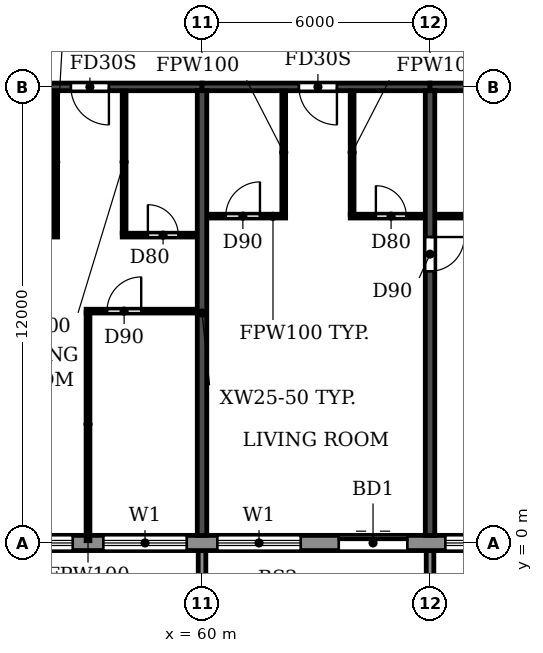
"""IFC4 building model, lengths in metres.
Left out: names, types, materials, properties, quantities, classifications, styles, units other than length and angle.
Written with IfcOpenShell. Run it as: python <this file> out.ifc"""

import sys

from ifc_helpers import new_model, si_unit, direction, frame, frame_2d, origin, place, context, subcontext, project, spatial, polyline, rectangle, outline, extrude, source, transform, mapped, element, fill, save


model = new_model("IFC4")
c1 = context("Model", 3, precision=1e-05, world=origin(), true_north=direction((0.0, 1.0)))
c2 = subcontext(c1, "Body", "Model", "MODEL_VIEW")
j1 = project(units=[si_unit("LENGTHUNIT", "METRE"), si_unit("PLANEANGLEUNIT", "RADIAN")], contexts=[c1])
p1 = place(None, origin())
s1 = spatial("IfcSite", under=j1, at=p1, CompositionType="ELEMENT")
p2 = place(p1, origin())
s2 = spatial("IfcBuilding", under=s1, at=p2, CompositionType="ELEMENT")
p3 = place(p2, frame((0.0, 0.0, 191.7)))
s3 = spatial("IfcBuildingStorey", under=s2, at=p3, CompositionType="ELEMENT", Elevation=191.7)
p4 = place(p3, frame((60.0, 0.2, 0.0), z_axis=(0.0, 0.0, 1.0), x_axis=(0.0, 1.0, 0.0)))
e1 = element("IfcWall", 1, at=p4, inside=s3, PredefinedType="SHEAR", context=c2, shape_type="SweptSolid", body=[
    extrude(rectangle(XDim=11.7, YDim=0.25, at=frame_2d((5.85, 0.0))), origin(), (0.0, 0.0, 1.0), 3.08),
])
p5 = place(p3, frame((66.0, 0.2, 0.0), z_axis=(0.0, 0.0, 1.0), x_axis=(0.0, 1.0, 0.0)))
e2 = element("IfcWall", 2, at=p5, inside=s3, PredefinedType="SHEAR", context=c2, shape_type="SweptSolid", body=[
    extrude(rectangle(XDim=11.7, YDim=0.25, at=frame_2d((5.85, 0.0))), origin(), (0.0, 0.0, 1.0), 3.08),
])
p6 = place(p5, frame((6.95, 0.0, 0.0)))
e3 = element("IfcOpeningElement", 3, at=p6, cuts=e2, PredefinedType="OPENING", context=c2, shape_type="SweptSolid", body=[
    extrude(rectangle(XDim=0.9, YDim=2.1, at=frame_2d((0.45, 1.05))), frame((0.0, 0.135, 0.0), z_axis=(0.0, -1.0, 0.0), x_axis=(1.0, 0.0, 0.0)), (0.0, 0.0, 1.0), 0.27),
])
p7 = place(p3, frame((54.0, 12.0, 0.0), z_axis=(0.0, 0.0, 1.0), x_axis=(1.0, 0.0, 0.0)))
e4 = element("IfcWall", 4, at=p7, inside=s3, PredefinedType="SHEAR", context=c2, shape_type="SweptSolid", body=[
    extrude(rectangle(XDim=6.0, YDim=0.2, at=frame_2d((3.0, 0.0))), origin(), (0.0, 0.0, 1.0), 2.48),
])
p8 = place(p7, frame((2.55, 0.0, 0.0)))
e5 = element("IfcOpeningElement", 5, at=p8, cuts=e4, PredefinedType="OPENING", context=c2, shape_type="SweptSolid", body=[
    extrude(rectangle(XDim=1.0, YDim=2.1, at=frame_2d((0.5, 1.05))), frame((0.0, 0.11, 0.0), z_axis=(0.0, -1.0, 0.0), x_axis=(1.0, 0.0, 0.0)), (0.0, 0.0, 1.0), 0.22),
])
p9 = place(p3, frame((60.0, 12.0, 0.0), z_axis=(0.0, 0.0, 1.0), x_axis=(1.0, 0.0, 0.0)))
e6 = element("IfcWall", 6, at=p9, inside=s3, PredefinedType="SHEAR", context=c2, shape_type="SweptSolid", body=[
    extrude(rectangle(XDim=6.0, YDim=0.2, at=frame_2d((3.0, 0.0))), origin(), (0.0, 0.0, 1.0), 2.48),
])
p10 = place(p9, frame((2.55, 0.0, 0.0)))
e7 = element("IfcOpeningElement", 7, at=p10, cuts=e6, PredefinedType="OPENING", context=c2, shape_type="SweptSolid", body=[
    extrude(rectangle(XDim=1.0, YDim=2.1, at=frame_2d((0.5, 1.05))), frame((0.0, 0.11, 0.0), z_axis=(0.0, -1.0, 0.0), x_axis=(1.0, 0.0, 0.0)), (0.0, 0.0, 1.0), 0.22),
])
p11 = place(p3, frame((66.0, 12.0, 0.0), z_axis=(0.0, 0.0, 1.0), x_axis=(1.0, 0.0, 0.0)))
e8 = element("IfcWall", 8, at=p11, inside=s3, PredefinedType="SHEAR", context=c2, shape_type="SweptSolid", body=[
    extrude(rectangle(XDim=6.0, YDim=0.2, at=frame_2d((3.0, 0.0))), origin(), (0.0, 0.0, 1.0), 2.48),
])
p12 = place(p3, frame((22.683, 0.0, 0.0), z_axis=(0.0, 0.0, 1.0), x_axis=(1.0, 0.0, 0.0)))
e9 = element("IfcWall", 9, at=p12, inside=s3, PredefinedType="STANDARD", context=c2, shape_type="SweptSolid", body=[
    extrude(rectangle(XDim=56.634, YDim=0.4, at=frame_2d((28.317, 0.0))), origin(), (0.0, 0.0, 1.0), 3.08),
])
p13 = place(p12, frame((1.717, 0.0, 0.9)))
e10 = element("IfcOpeningElement", 10, at=p13, cuts=e9, PredefinedType="OPENING", context=c2, shape_type="SweptSolid", body=[
    extrude(rectangle(XDim=2.2, YDim=1.5, at=frame_2d((1.1, 0.75))), frame((0.0, 0.21, 0.0), z_axis=(0.0, -1.0, 0.0), x_axis=(1.0, 0.0, 0.0)), (0.0, 0.0, 1.0), 0.42),
])
p14 = place(p12, frame((4.917, 0.0, 0.0)))
e11 = element("IfcOpeningElement", 11, at=p14, cuts=e9, PredefinedType="OPENING", context=c2, shape_type="SweptSolid", body=[
    extrude(rectangle(XDim=1.8, YDim=2.4, at=frame_2d((0.9, 1.2))), frame((0.0, 0.21, 0.0), z_axis=(0.0, -1.0, 0.0), x_axis=(1.0, 0.0, 0.0)), (0.0, 0.0, 1.0), 0.42),
])
p15 = place(p12, frame((7.717, 0.0, 0.9)))
e12 = element("IfcOpeningElement", 12, at=p15, cuts=e9, PredefinedType="OPENING", context=c2, shape_type="SweptSolid", body=[
    extrude(rectangle(XDim=2.2, YDim=1.5, at=frame_2d((1.1, 0.75))), frame((0.0, 0.21, 0.0), z_axis=(0.0, -1.0, 0.0), x_axis=(1.0, 0.0, 0.0)), (0.0, 0.0, 1.0), 0.42),
])
p16 = place(p12, frame((10.717, 0.0, 0.9)))
e13 = element("IfcOpeningElement", 13, at=p16, cuts=e9, PredefinedType="OPENING", context=c2, shape_type="SweptSolid", body=[
    extrude(rectangle(XDim=2.2, YDim=1.5, at=frame_2d((1.1, 0.75))), frame((0.0, 0.21, 0.0), z_axis=(0.0, -1.0, 0.0), x_axis=(1.0, 0.0, 0.0)), (0.0, 0.0, 1.0), 0.42),
])
p17 = place(p12, frame((13.717, 0.0, 0.9)))
e14 = element("IfcOpeningElement", 14, at=p17, cuts=e9, PredefinedType="OPENING", context=c2, shape_type="SweptSolid", body=[
    extrude(rectangle(XDim=2.2, YDim=1.5, at=frame_2d((1.1, 0.75))), frame((0.0, 0.21, 0.0), z_axis=(0.0, -1.0, 0.0), x_axis=(1.0, 0.0, 0.0)), (0.0, 0.0, 1.0), 0.42),
])
p18 = place(p12, frame((16.917, 0.0, 0.0)))
e15 = element("IfcOpeningElement", 15, at=p18, cuts=e9, PredefinedType="OPENING", context=c2, shape_type="SweptSolid", body=[
    extrude(rectangle(XDim=1.8, YDim=2.4, at=frame_2d((0.9, 1.2))), frame((0.0, 0.21, 0.0), z_axis=(0.0, -1.0, 0.0), x_axis=(1.0, 0.0, 0.0)), (0.0, 0.0, 1.0), 0.42),
])
p19 = place(p12, frame((19.717, 0.0, 0.9)))
e16 = element("IfcOpeningElement", 16, at=p19, cuts=e9, PredefinedType="OPENING", context=c2, shape_type="SweptSolid", body=[
    extrude(rectangle(XDim=2.2, YDim=1.5, at=frame_2d((1.1, 0.75))), frame((0.0, 0.21, 0.0), z_axis=(0.0, -1.0, 0.0), x_axis=(1.0, 0.0, 0.0)), (0.0, 0.0, 1.0), 0.42),
])
p20 = place(p12, frame((22.717, 0.0, 0.9)))
e17 = element("IfcOpeningElement", 17, at=p20, cuts=e9, PredefinedType="OPENING", context=c2, shape_type="SweptSolid", body=[
    extrude(rectangle(XDim=2.2, YDim=1.5, at=frame_2d((1.1, 0.75))), frame((0.0, 0.21, 0.0), z_axis=(0.0, -1.0, 0.0), x_axis=(1.0, 0.0, 0.0)), (0.0, 0.0, 1.0), 0.42),
])
p21 = place(p12, frame((25.917, 0.0, 0.0)))
e18 = element("IfcOpeningElement", 18, at=p21, cuts=e9, PredefinedType="OPENING", context=c2, shape_type="SweptSolid", body=[
    extrude(rectangle(XDim=1.8, YDim=2.4, at=frame_2d((0.9, 1.2))), frame((0.0, 0.21, 0.0), z_axis=(0.0, -1.0, 0.0), x_axis=(1.0, 0.0, 0.0)), (0.0, 0.0, 1.0), 0.42),
])
p22 = place(p12, frame((28.717, 0.0, 0.9)))
e19 = element("IfcOpeningElement", 19, at=p22, cuts=e9, PredefinedType="OPENING", context=c2, shape_type="SweptSolid", body=[
    extrude(rectangle(XDim=2.2, YDim=1.5, at=frame_2d((1.1, 0.75))), frame((0.0, 0.21, 0.0), z_axis=(0.0, -1.0, 0.0), x_axis=(1.0, 0.0, 0.0)), (0.0, 0.0, 1.0), 0.42),
])
p23 = place(p12, frame((31.717, 0.0, 0.9)))
e20 = element("IfcOpeningElement", 20, at=p23, cuts=e9, PredefinedType="OPENING", context=c2, shape_type="SweptSolid", body=[
    extrude(rectangle(XDim=2.2, YDim=1.5, at=frame_2d((1.1, 0.75))), frame((0.0, 0.21, 0.0), z_axis=(0.0, -1.0, 0.0), x_axis=(1.0, 0.0, 0.0)), (0.0, 0.0, 1.0), 0.42),
])
p24 = place(p12, frame((34.717, 0.0, 0.9)))
e21 = element("IfcOpeningElement", 21, at=p24, cuts=e9, PredefinedType="OPENING", context=c2, shape_type="SweptSolid", body=[
    extrude(rectangle(XDim=2.2, YDim=1.5, at=frame_2d((1.1, 0.75))), frame((0.0, 0.21, 0.0), z_axis=(0.0, -1.0, 0.0), x_axis=(1.0, 0.0, 0.0)), (0.0, 0.0, 1.0), 0.42),
])
p25 = place(p12, frame((37.717, 0.0, 0.9)))
e22 = element("IfcOpeningElement", 22, at=p25, cuts=e9, PredefinedType="OPENING", context=c2, shape_type="SweptSolid", body=[
    extrude(rectangle(XDim=2.2, YDim=1.5, at=frame_2d((1.1, 0.75))), frame((0.0, 0.21, 0.0), z_axis=(0.0, -1.0, 0.0), x_axis=(1.0, 0.0, 0.0)), (0.0, 0.0, 1.0), 0.42),
])
p26 = place(p12, frame((40.917, 0.0, 0.0)))
e23 = element("IfcOpeningElement", 23, at=p26, cuts=e9, PredefinedType="OPENING", context=c2, shape_type="SweptSolid", body=[
    extrude(rectangle(XDim=1.8, YDim=2.4, at=frame_2d((0.9, 1.2))), frame((0.0, 0.21, 0.0), z_axis=(0.0, -1.0, 0.0), x_axis=(1.0, 0.0, 0.0)), (0.0, 0.0, 1.0), 0.42),
])
p27 = place(p12, frame((43.717, 0.0, 0.9)))
e24 = element("IfcOpeningElement", 24, at=p27, cuts=e9, PredefinedType="OPENING", context=c2, shape_type="SweptSolid", body=[
    extrude(rectangle(XDim=2.2, YDim=1.5, at=frame_2d((1.1, 0.75))), frame((0.0, 0.21, 0.0), z_axis=(0.0, -1.0, 0.0), x_axis=(1.0, 0.0, 0.0)), (0.0, 0.0, 1.0), 0.42),
])
p28 = place(p12, frame((46.717, 0.0, 0.9)))
e25 = element("IfcOpeningElement", 25, at=p28, cuts=e9, PredefinedType="OPENING", context=c2, shape_type="SweptSolid", body=[
    extrude(rectangle(XDim=2.2, YDim=1.5, at=frame_2d((1.1, 0.75))), frame((0.0, 0.21, 0.0), z_axis=(0.0, -1.0, 0.0), x_axis=(1.0, 0.0, 0.0)), (0.0, 0.0, 1.0), 0.42),
])
p29 = place(p12, frame((49.917, 0.0, 0.0)))
e26 = element("IfcOpeningElement", 26, at=p29, cuts=e9, PredefinedType="OPENING", context=c2, shape_type="SweptSolid", body=[
    extrude(rectangle(XDim=1.8, YDim=2.4, at=frame_2d((0.9, 1.2))), frame((0.0, 0.21, 0.0), z_axis=(0.0, -1.0, 0.0), x_axis=(1.0, 0.0, 0.0)), (0.0, 0.0, 1.0), 0.42),
])
p30 = place(p12, frame((52.717, 0.0, 0.9)))
e27 = element("IfcOpeningElement", 27, at=p30, cuts=e9, PredefinedType="OPENING", context=c2, shape_type="SweptSolid", body=[
    extrude(rectangle(XDim=2.2, YDim=1.5, at=frame_2d((1.1, 0.75))), frame((0.0, 0.21, 0.0), z_axis=(0.0, -1.0, 0.0), x_axis=(1.0, 0.0, 0.0)), (0.0, 0.0, 1.0), 0.42),
])
m1 = source(origin(), c2, "Body", "SweptSolid", [
    extrude(outline(polyline([(0.0, 0.0), (0.2, 0.0), (0.2, 1.65), (0.0, 1.65), (0.0, 0.0)])), origin(), (0.0, 0.0, 1.0), 3.1),
])
for number, where in (
    (28, (59.9, -1.85, 0.0)),
    (29, (65.9, -1.85, 0.0)),
):
    element("IfcWall", number, at=place(p3, frame(where)), inside=s3, PredefinedType="STANDARD", context=c2, shape_type="MappedRepresentation", body=[
        mapped(m1, transform((0.0, 0.0, 0.0))),
    ])
p31 = place(p3, frame((56.95, 6.1, 0.0), z_axis=(0.0, 0.0, 1.0), x_axis=(1.0, 0.0, 0.0)))
e30 = element("IfcWall", 30, at=p31, inside=s3, PredefinedType="PARTITIONING", context=c2, shape_type="SweptSolid", body=[
    extrude(rectangle(XDim=2.915, YDim=0.1, at=frame_2d((1.458, 0.0))), origin(), (0.0, 0.0, 1.0), 3.08),
])
p32 = place(p31, frame((0.55, 0.0, 0.0)))
e31 = element("IfcOpeningElement", 31, at=p32, cuts=e30, PredefinedType="OPENING", context=c2, shape_type="SweptSolid", body=[
    extrude(rectangle(XDim=0.9, YDim=2.1, at=frame_2d((0.45, 1.05))), frame((0.0, 0.06, 0.0), z_axis=(0.0, -1.0, 0.0), x_axis=(1.0, 0.0, 0.0)), (0.0, 0.0, 1.0), 0.12),
])
p33 = place(p3, frame((54.135, 8.1, 0.0), z_axis=(0.0, 0.0, 1.0), x_axis=(1.0, 0.0, 0.0)))
e32 = element("IfcWall", 32, at=p33, inside=s3, PredefinedType="PARTITIONING", context=c2, shape_type="SweptSolid", body=[
    extrude(rectangle(XDim=2.065, YDim=0.1, at=frame_2d((1.032, 0.0))), origin(), (0.0, 0.0, 1.0), 3.08),
])
p34 = place(p33, frame((0.49, 0.0, 0.0)))
e33 = element("IfcOpeningElement", 33, at=p34, cuts=e32, PredefinedType="OPENING", context=c2, shape_type="SweptSolid", body=[
    extrude(rectangle(XDim=0.9, YDim=2.1, at=frame_2d((0.45, 1.05))), frame((0.0, 0.06, 0.0), z_axis=(0.0, -1.0, 0.0), x_axis=(1.0, 0.0, 0.0)), (0.0, 0.0, 1.0), 0.12),
])
p35 = place(p3, frame((57.9, 8.1, 0.0), z_axis=(0.0, 0.0, 1.0), x_axis=(1.0, 0.0, 0.0)))
e34 = element("IfcWall", 34, at=p35, inside=s3, PredefinedType="PARTITIONING", context=c2, shape_type="SweptSolid", body=[
    extrude(rectangle(XDim=1.965, YDim=0.1, at=frame_2d((0.982, 0.0))), origin(), (0.0, 0.0, 1.0), 3.08),
])
p36 = place(p35, frame((0.675, 0.0, 0.0)))
e35 = element("IfcOpeningElement", 35, at=p36, cuts=e34, PredefinedType="OPENING", context=c2, shape_type="SweptSolid", body=[
    extrude(rectangle(XDim=0.8, YDim=2.1, at=frame_2d((0.4, 1.05))), frame((0.0, 0.06, 0.0), z_axis=(0.0, -1.0, 0.0), x_axis=(1.0, 0.0, 0.0)), (0.0, 0.0, 1.0), 0.12),
])
p37 = place(p3, frame((60.135, 8.6, 0.0), z_axis=(0.0, 0.0, 1.0), x_axis=(1.0, 0.0, 0.0)))
e36 = element("IfcWall", 36, at=p37, inside=s3, PredefinedType="PARTITIONING", context=c2, shape_type="SweptSolid", body=[
    extrude(rectangle(XDim=2.065, YDim=0.1, at=frame_2d((1.032, 0.0))), origin(), (0.0, 0.0, 1.0), 3.08),
])
p38 = place(p37, frame((0.49, 0.0, 0.0)))
e37 = element("IfcOpeningElement", 37, at=p38, cuts=e36, PredefinedType="OPENING", context=c2, shape_type="SweptSolid", body=[
    extrude(rectangle(XDim=0.9, YDim=2.1, at=frame_2d((0.45, 1.05))), frame((0.0, 0.06, 0.0), z_axis=(0.0, -1.0, 0.0), x_axis=(1.0, 0.0, 0.0)), (0.0, 0.0, 1.0), 0.12),
])
p39 = place(p3, frame((63.9, 8.6, 0.0), z_axis=(0.0, 0.0, 1.0), x_axis=(1.0, 0.0, 0.0)))
e38 = element("IfcWall", 38, at=p39, inside=s3, PredefinedType="PARTITIONING", context=c2, shape_type="SweptSolid", body=[
    extrude(rectangle(XDim=1.965, YDim=0.1, at=frame_2d((0.982, 0.0))), origin(), (0.0, 0.0, 1.0), 3.08),
])
p40 = place(p39, frame((0.675, 0.0, 0.0)))
e39 = element("IfcOpeningElement", 39, at=p40, cuts=e38, PredefinedType="OPENING", context=c2, shape_type="SweptSolid", body=[
    extrude(rectangle(XDim=0.8, YDim=2.1, at=frame_2d((0.4, 1.05))), frame((0.0, 0.06, 0.0), z_axis=(0.0, -1.0, 0.0), x_axis=(1.0, 0.0, 0.0)), (0.0, 0.0, 1.0), 0.12),
])
p41 = place(p3, frame((66.135, 8.6, 0.0), z_axis=(0.0, 0.0, 1.0), x_axis=(1.0, 0.0, 0.0)))
e40 = element("IfcWall", 40, at=p41, inside=s3, PredefinedType="PARTITIONING", context=c2, shape_type="SweptSolid", body=[
    extrude(rectangle(XDim=2.765, YDim=0.1, at=frame_2d((1.382, 0.0))), origin(), (0.0, 0.0, 1.0), 3.08),
])
p42 = place(p41, frame((0.965, 0.0, 0.0)))
e41 = element("IfcOpeningElement", 41, at=p42, cuts=e40, PredefinedType="OPENING", context=c2, shape_type="SweptSolid", body=[
    extrude(rectangle(XDim=0.8, YDim=2.1, at=frame_2d((0.4, 1.05))), frame((0.0, 0.06, 0.0), z_axis=(0.0, -1.0, 0.0), x_axis=(1.0, 0.0, 0.0)), (0.0, 0.0, 1.0), 0.12),
])
p43 = place(p3, frame((56.15, 8.15, 0.0), z_axis=(0.0, 0.0, 1.0), x_axis=(0.0, 1.0, 0.0)))
e42 = element("IfcWall", 42, at=p43, inside=s3, PredefinedType="PARTITIONING", context=c2, shape_type="SweptSolid", body=[
    extrude(rectangle(XDim=3.74, YDim=0.1, at=frame_2d((1.87, 0.0))), origin(), (0.0, 0.0, 1.0), 3.08),
])
p44 = place(p3, frame((57.0, 0.06, 0.0), z_axis=(0.0, 0.0, 1.0), x_axis=(0.0, 1.0, 0.0)))
e43 = element("IfcWall", 43, at=p44, inside=s3, PredefinedType="PARTITIONING", context=c2, shape_type="SweptSolid", body=[
    extrude(rectangle(XDim=5.99, YDim=0.1, at=frame_2d((2.995, 0.0))), origin(), (0.0, 0.0, 1.0), 3.08),
])
p45 = place(p3, frame((57.95, 8.15, 0.0), z_axis=(0.0, 0.0, 1.0), x_axis=(0.0, 1.0, 0.0)))
e44 = element("IfcWall", 44, at=p45, inside=s3, PredefinedType="PARTITIONING", context=c2, shape_type="SweptSolid", body=[
    extrude(rectangle(XDim=3.74, YDim=0.1, at=frame_2d((1.87, 0.0))), origin(), (0.0, 0.0, 1.0), 3.08),
])
for number, where, z_axis, x_axis in (
    (45, (62.15, 8.65, 0.0), (0.0, 0.0, 1.0), (0.0, 1.0, 0.0)),
    (46, (63.95, 8.65, 0.0), (0.0, 0.0, 1.0), (0.0, 1.0, 0.0)),
):
    element("IfcWall", number, at=place(p3, frame(where, z_axis=z_axis, x_axis=x_axis)), inside=s3, PredefinedType="PARTITIONING", context=c2, shape_type="SweptSolid", body=[
        extrude(rectangle(XDim=3.24, YDim=0.1, at=frame_2d((1.62, 0.0))), origin(), (0.0, 0.0, 1.0), 3.08),
    ])
p46 = place(p23, origin())
e47 = element("IfcWindow", 47, at=p46, inside=s3, PartitioningType="DOUBLE_PANEL_HORIZONTAL", PredefinedType="WINDOW", context=c2, shape_type="SweptSolid", body=[
    extrude(rectangle(XDim=2.2, YDim=1.5, at=frame_2d((1.1, 0.75))), frame((0.0, 0.03, 0.0), z_axis=(0.0, -1.0, 0.0), x_axis=(1.0, 0.0, 0.0)), (0.0, 0.0, 1.0), 0.06),
])
fill(e20, e47)
p47 = place(p24, origin())
e48 = element("IfcWindow", 48, at=p47, inside=s3, PartitioningType="DOUBLE_PANEL_HORIZONTAL", PredefinedType="WINDOW", context=c2, shape_type="SweptSolid", body=[
    extrude(rectangle(XDim=2.2, YDim=1.5, at=frame_2d((1.1, 0.75))), frame((0.0, 0.03, 0.0), z_axis=(0.0, -1.0, 0.0), x_axis=(1.0, 0.0, 0.0)), (0.0, 0.0, 1.0), 0.06),
])
fill(e21, e48)
p48 = place(p25, origin())
e49 = element("IfcWindow", 49, at=p48, inside=s3, PartitioningType="DOUBLE_PANEL_HORIZONTAL", PredefinedType="WINDOW", context=c2, shape_type="SweptSolid", body=[
    extrude(rectangle(XDim=2.2, YDim=1.5, at=frame_2d((1.1, 0.75))), frame((0.0, 0.03, 0.0), z_axis=(0.0, -1.0, 0.0), x_axis=(1.0, 0.0, 0.0)), (0.0, 0.0, 1.0), 0.06),
])
fill(e22, e49)
p49 = place(p26, origin())
e50 = element("IfcDoor", 50, at=p49, inside=s3, OperationType="DOUBLE_DOOR_SLIDING", PredefinedType="DOOR", context=c2, shape_type="SweptSolid", body=[
    extrude(rectangle(XDim=1.8, YDim=2.4, at=frame_2d((0.9, 1.2))), frame((0.0, 0.025, 0.0), z_axis=(0.0, -1.0, 0.0), x_axis=(1.0, 0.0, 0.0)), (0.0, 0.0, 1.0), 0.05),
])
fill(e23, e50)
p50 = place(p27, origin())
e51 = element("IfcWindow", 51, at=p50, inside=s3, PartitioningType="DOUBLE_PANEL_HORIZONTAL", PredefinedType="WINDOW", context=c2, shape_type="SweptSolid", body=[
    extrude(rectangle(XDim=2.2, YDim=1.5, at=frame_2d((1.1, 0.75))), frame((0.0, 0.03, 0.0), z_axis=(0.0, -1.0, 0.0), x_axis=(1.0, 0.0, 0.0)), (0.0, 0.0, 1.0), 0.06),
])
fill(e24, e51)
p51 = place(p8, frame((1.0, 0.0, 0.0), z_axis=(0.0, 0.0, 1.0), x_axis=(-1.0, 0.0, 0.0)))
e52 = element("IfcDoor", 52, at=p51, inside=s3, OperationType="SINGLE_SWING_LEFT", PredefinedType="DOOR", context=c2, shape_type="SweptSolid", body=[
    extrude(rectangle(XDim=1.0, YDim=2.1, at=frame_2d((0.5, 1.05))), frame((0.0, 0.025, 0.0), z_axis=(0.0, -1.0, 0.0), x_axis=(1.0, 0.0, 0.0)), (0.0, 0.0, 1.0), 0.05),
])
fill(e5, e52)
p52 = place(p32, origin())
e53 = element("IfcDoor", 53, at=p52, inside=s3, OperationType="SINGLE_SWING_RIGHT", PredefinedType="DOOR", context=c2, shape_type="SweptSolid", body=[
    extrude(rectangle(XDim=0.9, YDim=2.1, at=frame_2d((0.45, 1.05))), frame((0.0, 0.025, 0.0), z_axis=(0.0, -1.0, 0.0), x_axis=(1.0, 0.0, 0.0)), (0.0, 0.0, 1.0), 0.05),
])
fill(e31, e53)
p53 = place(p36, origin())
e54 = element("IfcDoor", 54, at=p53, inside=s3, OperationType="SINGLE_SWING_LEFT", PredefinedType="DOOR", context=c2, shape_type="SweptSolid", body=[
    extrude(rectangle(XDim=0.8, YDim=2.1, at=frame_2d((0.4, 1.05))), frame((0.0, 0.025, 0.0), z_axis=(0.0, -1.0, 0.0), x_axis=(1.0, 0.0, 0.0)), (0.0, 0.0, 1.0), 0.05),
])
fill(e35, e54)
p54 = place(p38, origin())
e55 = element("IfcDoor", 55, at=p54, inside=s3, OperationType="SINGLE_SWING_RIGHT", PredefinedType="DOOR", context=c2, shape_type="SweptSolid", body=[
    extrude(rectangle(XDim=0.9, YDim=2.1, at=frame_2d((0.45, 1.05))), frame((0.0, 0.025, 0.0), z_axis=(0.0, -1.0, 0.0), x_axis=(1.0, 0.0, 0.0)), (0.0, 0.0, 1.0), 0.05),
])
fill(e37, e55)
p55 = place(p10, frame((1.0, 0.0, 0.0), z_axis=(0.0, 0.0, 1.0), x_axis=(-1.0, 0.0, 0.0)))
e56 = element("IfcDoor", 56, at=p55, inside=s3, OperationType="SINGLE_SWING_LEFT", PredefinedType="DOOR", context=c2, shape_type="SweptSolid", body=[
    extrude(rectangle(XDim=1.0, YDim=2.1, at=frame_2d((0.5, 1.05))), frame((0.0, 0.025, 0.0), z_axis=(0.0, -1.0, 0.0), x_axis=(1.0, 0.0, 0.0)), (0.0, 0.0, 1.0), 0.05),
])
fill(e7, e56)
p56 = place(p40, origin())
e57 = element("IfcDoor", 57, at=p56, inside=s3, OperationType="SINGLE_SWING_LEFT", PredefinedType="DOOR", context=c2, shape_type="SweptSolid", body=[
    extrude(rectangle(XDim=0.8, YDim=2.1, at=frame_2d((0.4, 1.05))), frame((0.0, 0.025, 0.0), z_axis=(0.0, -1.0, 0.0), x_axis=(1.0, 0.0, 0.0)), (0.0, 0.0, 1.0), 0.05),
])
fill(e39, e57)
p57 = place(p6, frame((0.9, 0.0, 0.0), z_axis=(0.0, 0.0, 1.0), x_axis=(-1.0, 0.0, 0.0)))
e58 = element("IfcDoor", 58, at=p57, inside=s3, OperationType="SINGLE_SWING_LEFT", PredefinedType="DOOR", context=c2, shape_type="SweptSolid", body=[
    extrude(rectangle(XDim=0.9, YDim=2.1, at=frame_2d((0.45, 1.05))), frame((0.0, 0.025, 0.0), z_axis=(0.0, -1.0, 0.0), x_axis=(1.0, 0.0, 0.0)), (0.0, 0.0, 1.0), 0.05),
])
fill(e3, e58)
save(model, sys.argv[1])
